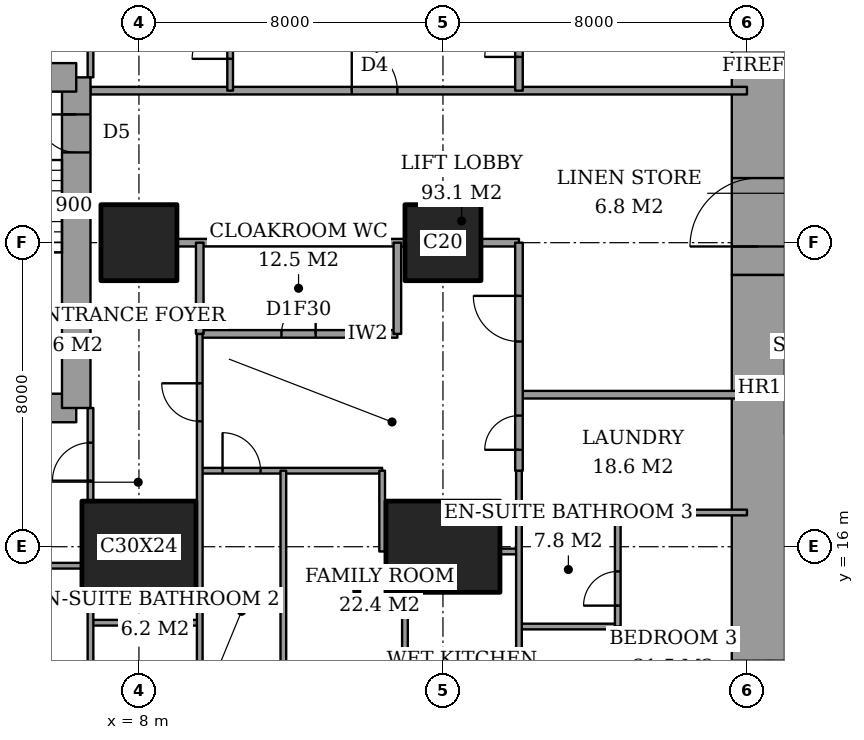
"""IFC4 building model, lengths in metres.
Left out: names, types, materials, properties, quantities, classifications, styles, units other than length and angle.
Written with IfcOpenShell. Run it as: python <this file> out.ifc"""

import sys

from ifc_helpers import new_model, si_unit, direction, frame, frame_2d, origin, origin_2d, place, context, subcontext, project, spatial, rectangle, extrude, element, fill, save


model = new_model("IFC4")
c1 = context("Model", 3, precision=1e-05, world=origin(), true_north=direction((0.0, 1.0)))
c2 = subcontext(c1, "Body", "Model", "MODEL_VIEW")
j1 = project(units=[si_unit("LENGTHUNIT", "METRE"), si_unit("PLANEANGLEUNIT", "RADIAN")], contexts=[c1])
p1 = place(None, origin())
s1 = spatial("IfcSite", under=j1, at=p1, CompositionType="ELEMENT")
p2 = place(p1, origin())
s2 = spatial("IfcBuilding", under=s1, at=p2, CompositionType="ELEMENT")
p3 = place(p2, frame((0.0, 0.0, 168.2)))
s3 = spatial("IfcBuildingStorey", under=s2, at=p3, CompositionType="ELEMENT", Elevation=168.2)
p4 = place(p3, frame((8.0, 16.0, 0.0), z_axis=(0.0, 0.0, 1.0), x_axis=(1.0, 0.0, 0.0)))
e1 = element("IfcColumn", 1, at=p4, inside=s3, PredefinedType="COLUMN", context=c2, shape_type="SweptSolid", body=[
    extrude(rectangle(XDim=3.0, YDim=2.4, at=origin_2d()), origin(), (0.0, 0.0, 1.0), 3.6),
])
p5 = place(p3, frame((8.0, 24.0, 0.0), z_axis=(0.0, 0.0, 1.0), x_axis=(1.0, 0.0, 0.0)))
e2 = element("IfcColumn", 2, at=p5, inside=s3, PredefinedType="COLUMN", context=c2, shape_type="SweptSolid", body=[
    extrude(rectangle(XDim=2.0, YDim=2.0, at=origin_2d()), origin(), (0.0, 0.0, 1.0), 3.6),
])
p6 = place(p3, frame((16.0, 16.0, 0.0), z_axis=(0.0, 0.0, 1.0), x_axis=(1.0, 0.0, 0.0)))
e3 = element("IfcColumn", 3, at=p6, inside=s3, PredefinedType="COLUMN", context=c2, shape_type="SweptSolid", body=[
    extrude(rectangle(XDim=3.0, YDim=2.4, at=origin_2d()), origin(), (0.0, 0.0, 1.0), 3.6),
])
p7 = place(p3, frame((16.0, 24.0, 0.0), z_axis=(0.0, 0.0, 1.0), x_axis=(1.0, 0.0, 0.0)))
e4 = element("IfcColumn", 4, at=p7, inside=s3, PredefinedType="COLUMN", context=c2, shape_type="SweptSolid", body=[
    extrude(rectangle(XDim=2.0, YDim=2.0, at=origin_2d()), origin(), (0.0, 0.0, 1.0), 3.6),
])
p8 = place(p3, frame((24.3, 13.0, 0.0), z_axis=(0.0, 0.0, 1.0), x_axis=(0.0, 1.0, 0.0)))
e5 = element("IfcWall", 5, at=p8, inside=s3, PredefinedType="SHEAR", context=c2, shape_type="SweptSolid", body=[
    extrude(rectangle(XDim=10.15, YDim=1.4, at=frame_2d((5.075, 0.0))), origin(), (0.0, 0.0, 1.0), 3.6),
])
p9 = place(p3, frame((24.3, 23.15, 0.0), z_axis=(0.0, 0.0, 1.0), x_axis=(0.0, 1.0, 0.0)))
e6 = element("IfcWall", 6, at=p9, inside=s3, PredefinedType="SHEAR", context=c2, shape_type="SweptSolid", body=[
    extrude(rectangle(XDim=11.85, YDim=1.4, at=frame_2d((5.925, 0.0))), origin(), (0.0, 0.0, 1.0), 3.6),
])
p10 = place(p9, frame((0.75, 0.0, 0.0)))
e7 = element("IfcOpeningElement", 7, at=p10, cuts=e6, PredefinedType="OPENING", context=c2, shape_type="SweptSolid", body=[
    extrude(rectangle(XDim=1.8, YDim=2.4, at=frame_2d((0.9, 1.2))), frame((0.0, 0.71, 0.0), z_axis=(0.0, -1.0, 0.0), x_axis=(1.0, 0.0, 0.0)), (0.0, 0.0, 1.0), 1.42),
])
p11 = place(p3, frame((1.9, 19.65, 0.0), z_axis=(0.0, 0.0, 1.0), x_axis=(1.0, 0.0, 0.0)))
e8 = element("IfcWall", 8, at=p11, inside=s3, PredefinedType="SHEAR", context=c2, shape_type="SweptSolid", body=[
    extrude(rectangle(XDim=4.45, YDim=0.75, at=frame_2d((2.225, 0.0))), origin(), (0.0, 0.0, 1.0), 3.6),
])
p12 = place(p3, frame((6.35, 19.65, 0.0), z_axis=(0.0, 0.0, 1.0), x_axis=(0.0, 1.0, 0.0)))
e9 = element("IfcWall", 9, at=p12, inside=s3, PredefinedType="SHEAR", context=c2, shape_type="SweptSolid", body=[
    extrude(rectangle(XDim=8.7, YDim=0.75, at=frame_2d((4.35, 0.0))), origin(), (0.0, 0.0, 1.0), 3.6),
])
p13 = place(p12, frame((6.725, 0.0, 0.0)))
e10 = element("IfcOpeningElement", 10, at=p13, cuts=e9, PredefinedType="OPENING", context=c2, shape_type="SweptSolid", body=[
    extrude(rectangle(XDim=1.0, YDim=2.1, at=frame_2d((0.5, 1.05))), frame((0.0, 0.385, 0.0), z_axis=(0.0, -1.0, 0.0), x_axis=(1.0, 0.0, 0.0)), (0.0, 0.0, 1.0), 0.77),
])
p14 = place(p3, frame((6.35, 28.35, 0.0), z_axis=(0.0, 0.0, 1.0), x_axis=(-1.0, 0.0, 0.0)))
e11 = element("IfcWall", 11, at=p14, inside=s3, PredefinedType="SHEAR", context=c2, shape_type="SweptSolid", body=[
    extrude(rectangle(XDim=4.45, YDim=0.75, at=frame_2d((2.225, 0.0))), origin(), (0.0, 0.0, 1.0), 3.6),
])
p15 = place(p3, frame((18.0, 13.9, 0.0), z_axis=(0.0, 0.0, 1.0), x_axis=(1.0, 0.0, 0.0)))
e12 = element("IfcWall", 12, at=p15, inside=s3, PredefinedType="PARTITIONING", context=c2, shape_type="SweptSolid", body=[
    extrude(rectangle(XDim=2.6, YDim=0.15, at=frame_2d((1.3, 0.0))), origin(), (0.0, 0.0, 1.0), 3.25),
])
p16 = place(p3, frame((6.725, 14.0, 0.0), z_axis=(0.0, 0.0, 1.0), x_axis=(1.0, 0.0, 0.0)))
e13 = element("IfcWall", 13, at=p16, inside=s3, PredefinedType="PARTITIONING", context=c2, shape_type="SweptSolid", body=[
    extrude(rectangle(XDim=2.875, YDim=0.15, at=frame_2d((1.438, 0.0))), origin(), (0.0, 0.0, 1.0), 3.25),
])
p17 = place(p3, frame((1.35, 15.5, 0.0), z_axis=(0.0, 0.0, 1.0), x_axis=(1.0, 0.0, 0.0)))
e14 = element("IfcWall", 14, at=p17, inside=s3, PredefinedType="PARTITIONING", context=c2, shape_type="SweptSolid", body=[
    extrude(rectangle(XDim=5.15, YDim=0.15, at=frame_2d((2.575, 0.0))), origin(), (0.0, 0.0, 1.0), 3.25),
])
p18 = place(p3, frame((17.5, 15.875, 0.0), z_axis=(0.0, 0.0, 1.0), x_axis=(1.0, 0.0, 0.0)))
e15 = element("IfcWall", 15, at=p18, inside=s3, PredefinedType="PARTITIONING", context=c2, shape_type="SweptSolid", body=[
    extrude(rectangle(XDim=0.5, YDim=0.15, at=frame_2d((0.25, 0.0))), origin(), (0.0, 0.0, 1.0), 3.25),
])
p19 = place(p3, frame((18.0, 16.9, 0.0), z_axis=(0.0, 0.0, 1.0), x_axis=(1.0, 0.0, 0.0)))
e16 = element("IfcWall", 16, at=p19, inside=s3, PredefinedType="PARTITIONING", context=c2, shape_type="SweptSolid", body=[
    extrude(rectangle(XDim=6.0, YDim=0.15, at=frame_2d((3.0, 0.0))), origin(), (0.0, 0.0, 1.0), 3.25),
])
p20 = place(p3, frame((9.6, 18.0, 0.0), z_axis=(0.0, 0.0, 1.0), x_axis=(1.0, 0.0, 0.0)))
e17 = element("IfcWall", 17, at=p20, inside=s3, PredefinedType="PARTITIONING", context=c2, shape_type="SweptSolid", body=[
    extrude(rectangle(XDim=4.8, YDim=0.15, at=frame_2d((2.4, 0.0))), origin(), (0.0, 0.0, 1.0), 3.25),
])
p21 = place(p20, frame((0.6, 0.0, 0.0)))
e18 = element("IfcOpeningElement", 18, at=p21, cuts=e17, PredefinedType="OPENING", context=c2, shape_type="SweptSolid", body=[
    extrude(rectangle(XDim=1.0, YDim=2.1, at=frame_2d((0.5, 1.05))), frame((0.0, 0.085, 0.0), z_axis=(0.0, -1.0, 0.0), x_axis=(1.0, 0.0, 0.0)), (0.0, 0.0, 1.0), 0.17),
])
p22 = place(p3, frame((18.0, 20.0, 0.0), z_axis=(0.0, 0.0, 1.0), x_axis=(1.0, 0.0, 0.0)))
e19 = element("IfcWall", 19, at=p22, inside=s3, PredefinedType="PARTITIONING", context=c2, shape_type="SweptSolid", body=[
    extrude(rectangle(XDim=6.0, YDim=0.2, at=frame_2d((3.0, 0.0))), origin(), (0.0, 0.0, 1.0), 3.25),
])
p23 = place(p3, frame((9.6, 21.6, 0.0), z_axis=(0.0, 0.0, 1.0), x_axis=(1.0, 0.0, 0.0)))
e20 = element("IfcWall", 20, at=p23, inside=s3, PredefinedType="PARTITIONING", context=c2, shape_type="SweptSolid", body=[
    extrude(rectangle(XDim=5.2, YDim=0.2, at=frame_2d((2.6, 0.0))), origin(), (0.0, 0.0, 1.0), 3.25),
])
p24 = place(p23, frame((2.15, 0.0, 0.0)))
e21 = element("IfcOpeningElement", 21, at=p24, cuts=e20, PredefinedType="OPENING", context=c2, shape_type="SweptSolid", body=[
    extrude(rectangle(XDim=0.9, YDim=2.1, at=frame_2d((0.45, 1.05))), frame((0.0, 0.11, 0.0), z_axis=(0.0, -1.0, 0.0), x_axis=(1.0, 0.0, 0.0)), (0.0, 0.0, 1.0), 0.22),
])
p25 = place(p3, frame((9.0, 24.0, 0.0), z_axis=(0.0, 0.0, 1.0), x_axis=(1.0, 0.0, 0.0)))
e22 = element("IfcWall", 22, at=p25, inside=s3, PredefinedType="PARTITIONING", context=c2, shape_type="SweptSolid", body=[
    extrude(rectangle(XDim=6.0, YDim=0.2, at=frame_2d((3.0, 0.0))), origin(), (0.0, 0.0, 1.0), 3.25),
])
p26 = place(p3, frame((17.0, 24.0, 0.0), z_axis=(0.0, 0.0, 1.0), x_axis=(1.0, 0.0, 0.0)))
e23 = element("IfcWall", 23, at=p26, inside=s3, PredefinedType="PARTITIONING", context=c2, shape_type="SweptSolid", body=[
    extrude(rectangle(XDim=1.0, YDim=0.2, at=frame_2d((0.5, 0.0))), origin(), (0.0, 0.0, 1.0), 3.25),
])
p27 = place(p3, frame((6.725, 28.0, 0.0), z_axis=(0.0, 0.0, 1.0), x_axis=(1.0, 0.0, 0.0)))
e24 = element("IfcWall", 24, at=p27, inside=s3, PredefinedType="PARTITIONING", context=c2, shape_type="SweptSolid", body=[
    extrude(rectangle(XDim=17.275, YDim=0.2, at=frame_2d((8.637, 0.0))), origin(), (0.0, 0.0, 1.0), 3.25),
])
p28 = place(p27, frame((6.875, 0.0, 0.0)))
e25 = element("IfcOpeningElement", 25, at=p28, cuts=e24, PredefinedType="OPENING", context=c2, shape_type="SweptSolid", body=[
    extrude(rectangle(XDim=1.2, YDim=2.4, at=frame_2d((0.6, 1.2))), frame((0.0, 0.11, 0.0), z_axis=(0.0, -1.0, 0.0), x_axis=(1.0, 0.0, 0.0)), (0.0, 0.0, 1.0), 0.22),
])
p29 = place(p3, frame((6.725, 10.6, 0.0), z_axis=(0.0, 0.0, 1.0), x_axis=(0.0, 1.0, 0.0)))
e26 = element("IfcWall", 26, at=p29, inside=s3, PredefinedType="PARTITIONING", context=c2, shape_type="SweptSolid", body=[
    extrude(rectangle(XDim=4.2, YDim=0.15, at=frame_2d((2.1, 0.0))), origin(), (0.0, 0.0, 1.0), 3.25),
])
p30 = place(p3, frame((6.725, 17.2, 0.0), z_axis=(0.0, 0.0, 1.0), x_axis=(0.0, 1.0, 0.0)))
e27 = element("IfcWall", 27, at=p30, inside=s3, PredefinedType="PARTITIONING", context=c2, shape_type="SweptSolid", body=[
    extrude(rectangle(XDim=2.45, YDim=0.15, at=frame_2d((1.225, 0.0))), origin(), (0.0, 0.0, 1.0), 3.25),
])
p31 = place(p30, frame((0.538, 0.0, 0.0)))
e28 = element("IfcOpeningElement", 28, at=p31, cuts=e27, PredefinedType="OPENING", context=c2, shape_type="SweptSolid", body=[
    extrude(rectangle(XDim=1.0, YDim=2.1, at=frame_2d((0.5, 1.05))), frame((0.0, 0.085, 0.0), z_axis=(0.0, -1.0, 0.0), x_axis=(1.0, 0.0, 0.0)), (0.0, 0.0, 1.0), 0.17),
])
p32 = place(p3, frame((6.725, 28.35, 0.0), z_axis=(0.0, 0.0, 1.0), x_axis=(0.0, 1.0, 0.0)))
e29 = element("IfcWall", 29, at=p32, inside=s3, PredefinedType="PARTITIONING", context=c2, shape_type="SweptSolid", body=[
    extrude(rectangle(XDim=2.45, YDim=0.15, at=frame_2d((1.225, 0.0))), origin(), (0.0, 0.0, 1.0), 3.25),
])
p33 = place(p32, frame((0.962, 0.0, 0.0)))
e30 = element("IfcOpeningElement", 30, at=p33, cuts=e29, PredefinedType="OPENING", context=c2, shape_type="SweptSolid", body=[
    extrude(rectangle(XDim=0.9, YDim=2.1, at=frame_2d((0.45, 1.05))), frame((0.0, 0.085, 0.0), z_axis=(0.0, -1.0, 0.0), x_axis=(1.0, 0.0, 0.0)), (0.0, 0.0, 1.0), 0.17),
])
p34 = place(p3, frame((9.6, 21.6, 0.0), z_axis=(0.0, 0.0, 1.0), x_axis=(0.0, 1.0, 0.0)))
e31 = element("IfcWall", 31, at=p34, inside=s3, PredefinedType="PARTITIONING", context=c2, shape_type="SweptSolid", body=[
    extrude(rectangle(XDim=2.4, YDim=0.2, at=frame_2d((1.2, 0.0))), origin(), (0.0, 0.0, 1.0), 3.25),
])
p35 = place(p3, frame((9.6, 10.6, 0.0), z_axis=(0.0, 0.0, 1.0), x_axis=(0.0, 1.0, 0.0)))
e32 = element("IfcWall", 32, at=p35, inside=s3, PredefinedType="PARTITIONING", context=c2, shape_type="SweptSolid", body=[
    extrude(rectangle(XDim=11.0, YDim=0.15, at=frame_2d((5.5, 0.0))), origin(), (0.0, 0.0, 1.0), 3.25),
])
p36 = place(p35, frame((8.7, 0.0, 0.0)))
e33 = element("IfcOpeningElement", 33, at=p36, cuts=e32, PredefinedType="OPENING", context=c2, shape_type="SweptSolid", body=[
    extrude(rectangle(XDim=1.0, YDim=2.1, at=frame_2d((0.5, 1.05))), frame((0.0, 0.085, 0.0), z_axis=(0.0, -1.0, 0.0), x_axis=(1.0, 0.0, 0.0)), (0.0, 0.0, 1.0), 0.17),
])
p37 = place(p3, frame((10.4, 28.0, 0.0), z_axis=(0.0, 0.0, 1.0), x_axis=(0.0, 1.0, 0.0)))
e34 = element("IfcWall", 34, at=p37, inside=s3, PredefinedType="PARTITIONING", context=c2, shape_type="SweptSolid", body=[
    extrude(rectangle(XDim=9.4, YDim=0.15, at=frame_2d((4.7, 0.0))), origin(), (0.0, 0.0, 1.0), 3.25),
])
p38 = place(p37, frame((0.837, 0.0, 0.0)))
e35 = element("IfcOpeningElement", 35, at=p38, cuts=e34, PredefinedType="OPENING", context=c2, shape_type="SweptSolid", body=[
    extrude(rectangle(XDim=1.0, YDim=2.1, at=frame_2d((0.5, 1.05))), frame((0.0, 0.085, 0.0), z_axis=(0.0, -1.0, 0.0), x_axis=(1.0, 0.0, 0.0)), (0.0, 0.0, 1.0), 0.17),
])
p39 = place(p3, frame((11.8, 10.6, 0.0), z_axis=(0.0, 0.0, 1.0), x_axis=(0.0, 1.0, 0.0)))
e36 = element("IfcWall", 36, at=p39, inside=s3, PredefinedType="PARTITIONING", context=c2, shape_type="SweptSolid", body=[
    extrude(rectangle(XDim=7.4, YDim=0.15, at=frame_2d((3.7, 0.0))), origin(), (0.0, 0.0, 1.0), 3.25),
])
p40 = place(p3, frame((14.4, 15.875, 0.0), z_axis=(0.0, 0.0, 1.0), x_axis=(0.0, 1.0, 0.0)))
e37 = element("IfcWall", 37, at=p40, inside=s3, PredefinedType="PARTITIONING", context=c2, shape_type="SweptSolid", body=[
    extrude(rectangle(XDim=2.125, YDim=0.15, at=frame_2d((1.062, 0.0))), origin(), (0.0, 0.0, 1.0), 3.25),
])
p41 = place(p3, frame((14.8, 21.6, 0.0), z_axis=(0.0, 0.0, 1.0), x_axis=(0.0, 1.0, 0.0)))
e38 = element("IfcWall", 38, at=p41, inside=s3, PredefinedType="PARTITIONING", context=c2, shape_type="SweptSolid", body=[
    extrude(rectangle(XDim=2.4, YDim=0.2, at=frame_2d((1.2, 0.0))), origin(), (0.0, 0.0, 1.0), 3.25),
])
p42 = place(p3, frame((15.0, 10.6, 0.0), z_axis=(0.0, 0.0, 1.0), x_axis=(0.0, 1.0, 0.0)))
e39 = element("IfcWall", 39, at=p42, inside=s3, PredefinedType="PARTITIONING", context=c2, shape_type="SweptSolid", body=[
    extrude(rectangle(XDim=4.2, YDim=0.15, at=frame_2d((2.1, 0.0))), origin(), (0.0, 0.0, 1.0), 3.25),
])
p43 = place(p3, frame((18.0, 18.0, 0.0), z_axis=(0.0, 0.0, 1.0), x_axis=(0.0, 1.0, 0.0)))
e40 = element("IfcWall", 40, at=p43, inside=s3, PredefinedType="PARTITIONING", context=c2, shape_type="SweptSolid", body=[
    extrude(rectangle(XDim=6.0, YDim=0.2, at=frame_2d((3.0, 0.0))), origin(), (0.0, 0.0, 1.0), 3.25),
])
p44 = place(p43, frame((3.4, 0.0, 0.0)))
e41 = element("IfcOpeningElement", 41, at=p44, cuts=e40, PredefinedType="OPENING", context=c2, shape_type="SweptSolid", body=[
    extrude(rectangle(XDim=1.2, YDim=2.4, at=frame_2d((0.6, 1.2))), frame((0.0, 0.11, 0.0), z_axis=(0.0, -1.0, 0.0), x_axis=(1.0, 0.0, 0.0)), (0.0, 0.0, 1.0), 0.22),
])
p45 = place(p43, frame((0.55, 0.0, 0.0)))
e42 = element("IfcOpeningElement", 42, at=p45, cuts=e40, PredefinedType="OPENING", context=c2, shape_type="SweptSolid", body=[
    extrude(rectangle(XDim=0.9, YDim=2.1, at=frame_2d((0.45, 1.05))), frame((0.0, 0.11, 0.0), z_axis=(0.0, -1.0, 0.0), x_axis=(1.0, 0.0, 0.0)), (0.0, 0.0, 1.0), 0.22),
])
p46 = place(p3, frame((18.0, 28.0, 0.0), z_axis=(0.0, 0.0, 1.0), x_axis=(0.0, 1.0, 0.0)))
e43 = element("IfcWall", 43, at=p46, inside=s3, PredefinedType="PARTITIONING", context=c2, shape_type="SweptSolid", body=[
    extrude(rectangle(XDim=5.5, YDim=0.2, at=frame_2d((2.75, 0.0))), origin(), (0.0, 0.0, 1.0), 3.25),
])
p47 = place(p46, frame((0.887, 0.0, 0.0)))
e44 = element("IfcOpeningElement", 44, at=p47, cuts=e43, PredefinedType="OPENING", context=c2, shape_type="SweptSolid", body=[
    extrude(rectangle(XDim=0.9, YDim=2.1, at=frame_2d((0.45, 1.05))), frame((0.0, 0.11, 0.0), z_axis=(0.0, -1.0, 0.0), x_axis=(1.0, 0.0, 0.0)), (0.0, 0.0, 1.0), 0.22),
])
p48 = place(p3, frame((18.0, 10.6, 0.0), z_axis=(0.0, 0.0, 1.0), x_axis=(0.0, 1.0, 0.0)))
e45 = element("IfcWall", 45, at=p48, inside=s3, PredefinedType="PARTITIONING", context=c2, shape_type="SweptSolid", body=[
    extrude(rectangle(XDim=7.4, YDim=0.15, at=frame_2d((3.7, 0.0))), origin(), (0.0, 0.0, 1.0), 3.25),
])
p49 = place(p3, frame((20.6, 13.9, 0.0), z_axis=(0.0, 0.0, 1.0), x_axis=(0.0, 1.0, 0.0)))
e46 = element("IfcWall", 46, at=p49, inside=s3, PredefinedType="PARTITIONING", context=c2, shape_type="SweptSolid", body=[
    extrude(rectangle(XDim=3.0, YDim=0.15, at=frame_2d((1.5, 0.0))), origin(), (0.0, 0.0, 1.0), 3.25),
])
p50 = place(p49, frame((0.55, 0.0, 0.0)))
e47 = element("IfcOpeningElement", 47, at=p50, cuts=e46, PredefinedType="OPENING", context=c2, shape_type="SweptSolid", body=[
    extrude(rectangle(XDim=0.9, YDim=2.1, at=frame_2d((0.45, 1.05))), frame((0.0, 0.085, 0.0), z_axis=(0.0, -1.0, 0.0), x_axis=(1.0, 0.0, 0.0)), (0.0, 0.0, 1.0), 0.17),
])
p51 = place(p31, origin())
e48 = element("IfcDoor", 48, at=p51, inside=s3, OperationType="SINGLE_SWING_RIGHT", PredefinedType="DOOR", context=c2, shape_type="SweptSolid", body=[
    extrude(rectangle(XDim=1.0, YDim=2.1, at=frame_2d((0.5, 1.05))), frame((0.0, 0.025, 0.0), z_axis=(0.0, -1.0, 0.0), x_axis=(1.0, 0.0, 0.0)), (0.0, 0.0, 1.0), 0.05),
])
fill(e28, e48)
p52 = place(p36, origin())
e49 = element("IfcDoor", 49, at=p52, inside=s3, OperationType="SINGLE_SWING_LEFT", PredefinedType="DOOR", context=c2, shape_type="SweptSolid", body=[
    extrude(rectangle(XDim=1.0, YDim=2.1, at=frame_2d((0.5, 1.05))), frame((0.0, 0.025, 0.0), z_axis=(0.0, -1.0, 0.0), x_axis=(1.0, 0.0, 0.0)), (0.0, 0.0, 1.0), 0.05),
])
fill(e33, e49)
p53 = place(p24, origin())
e50 = element("IfcDoor", 50, at=p53, inside=s3, OperationType="SINGLE_SWING_LEFT", PredefinedType="DOOR", context=c2, shape_type="SweptSolid", body=[
    extrude(rectangle(XDim=0.9, YDim=2.1, at=frame_2d((0.45, 1.05))), frame((0.0, 0.025, 0.0), z_axis=(0.0, -1.0, 0.0), x_axis=(1.0, 0.0, 0.0)), (0.0, 0.0, 1.0), 0.05),
])
fill(e21, e50)
p54 = place(p44, origin())
e51 = element("IfcDoor", 51, at=p54, inside=s3, OperationType="SINGLE_SWING_LEFT", PredefinedType="DOOR", context=c2, shape_type="SweptSolid", body=[
    extrude(rectangle(XDim=1.2, YDim=2.4, at=frame_2d((0.6, 1.2))), frame((0.0, 0.025, 0.0), z_axis=(0.0, -1.0, 0.0), x_axis=(1.0, 0.0, 0.0)), (0.0, 0.0, 1.0), 0.05),
])
fill(e41, e51)
p55 = place(p21, origin())
e52 = element("IfcDoor", 52, at=p55, inside=s3, OperationType="SINGLE_SWING_RIGHT", PredefinedType="DOOR", context=c2, shape_type="SweptSolid", body=[
    extrude(rectangle(XDim=1.0, YDim=2.1, at=frame_2d((0.5, 1.05))), frame((0.0, 0.025, 0.0), z_axis=(0.0, -1.0, 0.0), x_axis=(1.0, 0.0, 0.0)), (0.0, 0.0, 1.0), 0.05),
])
fill(e18, e52)
p56 = place(p50, origin())
e53 = element("IfcDoor", 53, at=p56, inside=s3, OperationType="SINGLE_SWING_RIGHT", PredefinedType="DOOR", context=c2, shape_type="SweptSolid", body=[
    extrude(rectangle(XDim=0.9, YDim=2.1, at=frame_2d((0.45, 1.05))), frame((0.0, 0.025, 0.0), z_axis=(0.0, -1.0, 0.0), x_axis=(1.0, 0.0, 0.0)), (0.0, 0.0, 1.0), 0.05),
])
fill(e47, e53)
p57 = place(p45, origin())
e54 = element("IfcDoor", 54, at=p57, inside=s3, OperationType="SINGLE_SWING_RIGHT", PredefinedType="DOOR", context=c2, shape_type="SweptSolid", body=[
    extrude(rectangle(XDim=0.9, YDim=2.1, at=frame_2d((0.45, 1.05))), frame((0.0, 0.025, 0.0), z_axis=(0.0, -1.0, 0.0), x_axis=(1.0, 0.0, 0.0)), (0.0, 0.0, 1.0), 0.05),
])
fill(e42, e54)
p58 = place(p38, origin())
e55 = element("IfcDoor", 55, at=p58, inside=s3, OperationType="SINGLE_SWING_RIGHT", PredefinedType="DOOR", context=c2, shape_type="SweptSolid", body=[
    extrude(rectangle(XDim=1.0, YDim=2.1, at=frame_2d((0.5, 1.05))), frame((0.0, 0.025, 0.0), z_axis=(0.0, -1.0, 0.0), x_axis=(1.0, 0.0, 0.0)), (0.0, 0.0, 1.0), 0.05),
])
fill(e35, e55)
p59 = place(p28, origin())
e56 = element("IfcDoor", 56, at=p59, inside=s3, OperationType="SINGLE_SWING_RIGHT", PredefinedType="DOOR", context=c2, shape_type="SweptSolid", body=[
    extrude(rectangle(XDim=1.2, YDim=2.4, at=frame_2d((0.6, 1.2))), frame((0.0, 0.025, 0.0), z_axis=(0.0, -1.0, 0.0), x_axis=(1.0, 0.0, 0.0)), (0.0, 0.0, 1.0), 0.05),
])
fill(e25, e56)
p60 = place(p47, origin())
e57 = element("IfcDoor", 57, at=p60, inside=s3, OperationType="SINGLE_SWING_RIGHT", PredefinedType="DOOR", context=c2, shape_type="SweptSolid", body=[
    extrude(rectangle(XDim=0.9, YDim=2.1, at=frame_2d((0.45, 1.05))), frame((0.0, 0.025, 0.0), z_axis=(0.0, -1.0, 0.0), x_axis=(1.0, 0.0, 0.0)), (0.0, 0.0, 1.0), 0.05),
])
fill(e44, e57)
p61 = place(p10, origin())
e58 = element("IfcDoor", 58, at=p61, inside=s3, OperationType="DOUBLE_DOOR_DOUBLE_SWING", PredefinedType="DOOR", context=c2, shape_type="SweptSolid", body=[
    extrude(rectangle(XDim=1.8, YDim=2.4, at=frame_2d((0.9, 1.2))), frame((0.0, 0.025, 0.0), z_axis=(0.0, -1.0, 0.0), x_axis=(1.0, 0.0, 0.0)), (0.0, 0.0, 1.0), 0.05),
])
fill(e7, e58)
p62 = place(p13, origin())
e59 = element("IfcDoor", 59, at=p62, inside=s3, OperationType="SINGLE_SWING_LEFT", PredefinedType="DOOR", context=c2, shape_type="SweptSolid", body=[
    extrude(rectangle(XDim=1.0, YDim=2.1, at=frame_2d((0.5, 1.05))), frame((0.0, 0.025, 0.0), z_axis=(0.0, -1.0, 0.0), x_axis=(1.0, 0.0, 0.0)), (0.0, 0.0, 1.0), 0.05),
])
fill(e10, e59)
save(model, sys.argv[1])
